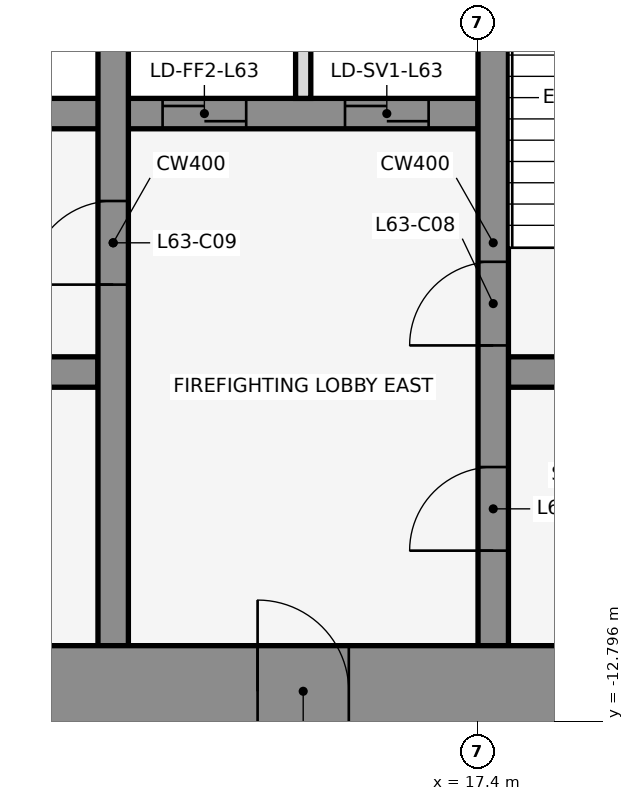
"""IFC4 building model, lengths in metres.
Left out: names, types, materials, properties, quantities, classifications, styles, units other than length and angle.
Written with IfcOpenShell. Run it as: python <this file> out.ifc"""

import sys

from ifc_helpers import new_model, si_unit, direction, frame, frame_2d, origin, place, context, subcontext, project, spatial, rectangle, extrude, element, fill, save


model = new_model("IFC4")
c1 = context("Model", 3, precision=1e-05, world=origin(), true_north=direction((0.0, 1.0)))
c2 = subcontext(c1, "Body", "Model", "MODEL_VIEW")
j1 = project(units=[si_unit("LENGTHUNIT", "METRE"), si_unit("PLANEANGLEUNIT", "RADIAN")], contexts=[c1])
p1 = place(None, origin())
s1 = spatial("IfcSite", under=j1, at=p1, CompositionType="ELEMENT")
p2 = place(p1, origin())
s2 = spatial("IfcBuilding", under=s1, at=p2, CompositionType="ELEMENT")
p3 = place(p2, frame((0.0, 0.0, 279.2)))
s3 = spatial("IfcBuildingStorey", under=s2, at=p3, CompositionType="ELEMENT", Elevation=279.2)
p4 = place(p3, frame((6.4, -8.2, 0.0), z_axis=(0.0, 0.0, 1.0), x_axis=(1.0, 0.0, 0.0)))
e1 = element("IfcWall", 1, at=p4, inside=s3, PredefinedType="SHEAR", context=c2, shape_type="SweptSolid", body=[
    extrude(rectangle(XDim=6.0, YDim=0.4, at=frame_2d((3.0, 0.0))), origin(), (0.0, 0.0, 1.0), 4.2),
])
p5 = place(p4, frame((2.65, 0.0, 0.0)))
e2 = element("IfcOpeningElement", 2, at=p5, cuts=e1, PredefinedType="OPENING", context=c2, shape_type="SweptSolid", body=[
    extrude(rectangle(XDim=0.9, YDim=2.1, at=frame_2d((0.45, 1.05))), frame((0.0, 0.212, 0.0), z_axis=(0.0, -1.0, 0.0), x_axis=(1.0, 0.0, 0.0)), (0.0, 0.0, 1.0), 0.424),
])
p6 = place(p3, frame((17.8, -8.2, 0.0), z_axis=(0.0, 0.0, 1.0), x_axis=(1.0, 0.0, 0.0)))
e3 = element("IfcWall", 3, at=p6, inside=s3, PredefinedType="SHEAR", context=c2, shape_type="SweptSolid", body=[
    extrude(rectangle(XDim=3.0, YDim=0.4, at=frame_2d((1.5, 0.0))), origin(), (0.0, 0.0, 1.0), 4.2),
])
p7 = place(p6, frame((0.85, 0.0, 0.0)))
e4 = element("IfcOpeningElement", 4, at=p7, cuts=e3, PredefinedType="OPENING", context=c2, shape_type="SweptSolid", body=[
    extrude(rectangle(XDim=1.2, YDim=2.1, at=frame_2d((0.6, 1.05))), frame((0.0, 0.212, 0.0), z_axis=(0.0, -1.0, 0.0), x_axis=(1.0, 0.0, 0.0)), (0.0, 0.0, 1.0), 0.424),
])
p8 = place(p3, frame((3.8, -4.8, 0.0), z_axis=(0.0, 0.0, 1.0), x_axis=(1.0, 0.0, 0.0)))
e5 = element("IfcWall", 5, at=p8, inside=s3, PredefinedType="SHEAR", context=c2, shape_type="SweptSolid", body=[
    extrude(rectangle(XDim=13.6, YDim=0.4, at=frame_2d((6.8, 0.0))), origin(), (0.0, 0.0, 1.0), 4.2),
])
p9 = place(p8, frame((0.75, 0.0, 0.0)))
e6 = element("IfcOpeningElement", 6, at=p9, cuts=e5, PredefinedType="OPENING", context=c2, shape_type="SweptSolid", body=[
    extrude(rectangle(XDim=1.2, YDim=2.1, at=frame_2d((0.6, 1.05))), frame((0.0, 0.212, 0.0), z_axis=(0.0, -1.0, 0.0), x_axis=(1.0, 0.0, 0.0)), (0.0, 0.0, 1.0), 0.424),
])
p10 = place(p8, frame((3.65, 0.0, 0.0)))
e7 = element("IfcOpeningElement", 7, at=p10, cuts=e5, PredefinedType="OPENING", context=c2, shape_type="SweptSolid", body=[
    extrude(rectangle(XDim=1.2, YDim=2.1, at=frame_2d((0.6, 1.05))), frame((0.0, 0.212, 0.0), z_axis=(0.0, -1.0, 0.0), x_axis=(1.0, 0.0, 0.0)), (0.0, 0.0, 1.0), 0.424),
])
p11 = place(p8, frame((6.65, 0.0, 0.0)))
e8 = element("IfcOpeningElement", 8, at=p11, cuts=e5, PredefinedType="OPENING", context=c2, shape_type="SweptSolid", body=[
    extrude(rectangle(XDim=1.2, YDim=2.1, at=frame_2d((0.6, 1.05))), frame((0.0, 0.212, 0.0), z_axis=(0.0, -1.0, 0.0), x_axis=(1.0, 0.0, 0.0)), (0.0, 0.0, 1.0), 0.424),
])
p12 = place(p8, frame((9.45, 0.0, 0.0)))
e9 = element("IfcOpeningElement", 9, at=p12, cuts=e5, PredefinedType="OPENING", context=c2, shape_type="SweptSolid", body=[
    extrude(rectangle(XDim=1.1, YDim=2.1, at=frame_2d((0.55, 1.05))), frame((0.0, 0.212, 0.0), z_axis=(0.0, -1.0, 0.0), x_axis=(1.0, 0.0, 0.0)), (0.0, 0.0, 1.0), 0.424),
])
p13 = place(p8, frame((11.85, 0.0, 0.0)))
e10 = element("IfcOpeningElement", 10, at=p13, cuts=e5, PredefinedType="OPENING", context=c2, shape_type="SweptSolid", body=[
    extrude(rectangle(XDim=1.1, YDim=2.1, at=frame_2d((0.55, 1.05))), frame((0.0, 0.212, 0.0), z_axis=(0.0, -1.0, 0.0), x_axis=(1.0, 0.0, 0.0)), (0.0, 0.0, 1.0), 0.424),
])
p14 = place(p3, frame((12.6, -11.8, 0.0), z_axis=(0.0, 0.0, 1.0), x_axis=(0.0, 1.0, 0.0)))
e11 = element("IfcWall", 11, at=p14, inside=s3, PredefinedType="SHEAR", context=c2, shape_type="SweptSolid", body=[
    extrude(rectangle(XDim=10.6, YDim=0.4, at=frame_2d((5.3, 0.0))), origin(), (0.0, 0.0, 1.0), 4.2),
])
p15 = place(p14, frame((4.75, 0.0, 0.0)))
e12 = element("IfcOpeningElement", 12, at=p15, cuts=e11, PredefinedType="OPENING", context=c2, shape_type="SweptSolid", body=[
    extrude(rectangle(XDim=1.1, YDim=2.1, at=frame_2d((0.55, 1.05))), frame((0.0, 0.212, 0.0), z_axis=(0.0, -1.0, 0.0), x_axis=(1.0, 0.0, 0.0)), (0.0, 0.0, 1.0), 0.424),
])
p16 = place(p3, frame((15.1, -4.6, 0.0), z_axis=(0.0, 0.0, 1.0), x_axis=(0.0, 1.0, 0.0)))
e13 = element("IfcWall", 13, at=p16, inside=s3, PredefinedType="PARTITIONING", context=c2, shape_type="SweptSolid", body=[
    extrude(rectangle(XDim=3.4, YDim=0.2, at=frame_2d((1.7, 0.0))), origin(), (0.0, 0.0, 1.0), 3.04),
])
p17 = place(p3, frame((17.6, -11.8, 0.0), z_axis=(0.0, 0.0, 1.0), x_axis=(0.0, 1.0, 0.0)))
e14 = element("IfcWall", 14, at=p17, inside=s3, PredefinedType="SHEAR", context=c2, shape_type="SweptSolid", body=[
    extrude(rectangle(XDim=10.6, YDim=0.4, at=frame_2d((5.3, 0.0))), origin(), (0.0, 0.0, 1.0), 4.2),
])
p18 = place(p17, frame((1.25, 0.0, 0.0)))
e15 = element("IfcOpeningElement", 15, at=p18, cuts=e14, PredefinedType="OPENING", context=c2, shape_type="SweptSolid", body=[
    extrude(rectangle(XDim=1.1, YDim=2.1, at=frame_2d((0.55, 1.05))), frame((0.0, 0.212, 0.0), z_axis=(0.0, -1.0, 0.0), x_axis=(1.0, 0.0, 0.0)), (0.0, 0.0, 1.0), 0.424),
])
p19 = place(p17, frame((3.95, 0.0, 0.0)))
e16 = element("IfcOpeningElement", 16, at=p19, cuts=e14, PredefinedType="OPENING", context=c2, shape_type="SweptSolid", body=[
    extrude(rectangle(XDim=1.1, YDim=2.1, at=frame_2d((0.55, 1.05))), frame((0.0, 0.212, 0.0), z_axis=(0.0, -1.0, 0.0), x_axis=(1.0, 0.0, 0.0)), (0.0, 0.0, 1.0), 0.424),
])
p20 = place(p3, frame((-22.0, -12.4, 0.0), z_axis=(0.0, 0.0, 1.0), x_axis=(1.0, 0.0, 0.0)))
e17 = element("IfcWall", 17, at=p20, inside=s3, PredefinedType="SHEAR", context=c2, shape_type="SweptSolid", body=[
    extrude(rectangle(XDim=44.0, YDim=1.2, at=frame_2d((22.0, 0.0))), origin(), (0.0, 0.0, 1.0), 4.2),
])
p21 = place(p20, frame((2.2, 0.0, 0.0)))
e18 = element("IfcOpeningElement", 18, at=p21, cuts=e17, PredefinedType="OPENING", context=c2, shape_type="SweptSolid", body=[
    extrude(rectangle(XDim=1.2, YDim=2.1, at=frame_2d((0.6, 1.05))), frame((0.0, 0.612, 0.0), z_axis=(0.0, -1.0, 0.0), x_axis=(1.0, 0.0, 0.0)), (0.0, 0.0, 1.0), 1.224),
])
p22 = place(p20, frame((21.4, 0.0, 0.0)))
e19 = element("IfcOpeningElement", 19, at=p22, cuts=e17, PredefinedType="OPENING", context=c2, shape_type="SweptSolid", body=[
    extrude(rectangle(XDim=1.2, YDim=2.1, at=frame_2d((0.6, 1.05))), frame((0.0, 0.612, 0.0), z_axis=(0.0, -1.0, 0.0), x_axis=(1.0, 0.0, 0.0)), (0.0, 0.0, 1.0), 1.224),
])
p23 = place(p20, frame((40.6, 0.0, 0.0)))
e20 = element("IfcOpeningElement", 20, at=p23, cuts=e17, PredefinedType="OPENING", context=c2, shape_type="SweptSolid", body=[
    extrude(rectangle(XDim=1.2, YDim=2.1, at=frame_2d((0.6, 1.05))), frame((0.0, 0.612, 0.0), z_axis=(0.0, -1.0, 0.0), x_axis=(1.0, 0.0, 0.0)), (0.0, 0.0, 1.0), 1.224),
])
p24 = place(p20, frame((16.0, 0.0, 0.0)))
e21 = element("IfcOpeningElement", 21, at=p24, cuts=e17, PredefinedType="OPENING", context=c2, shape_type="SweptSolid", body=[
    extrude(rectangle(XDim=1.8, YDim=2.1, at=frame_2d((0.9, 1.05))), frame((0.0, 0.612, 0.0), z_axis=(0.0, -1.0, 0.0), x_axis=(1.0, 0.0, 0.0)), (0.0, 0.0, 1.0), 1.224),
])
p25 = place(p20, frame((6.3, 0.0, 0.0)))
e22 = element("IfcOpeningElement", 22, at=p25, cuts=e17, PredefinedType="OPENING", context=c2, shape_type="SweptSolid", body=[
    extrude(rectangle(XDim=1.2, YDim=2.1, at=frame_2d((0.6, 1.05))), frame((0.0, 0.612, 0.0), z_axis=(0.0, -1.0, 0.0), x_axis=(1.0, 0.0, 0.0)), (0.0, 0.0, 1.0), 1.224),
])
p26 = place(p20, frame((26.2, 0.0, 0.0)))
e23 = element("IfcOpeningElement", 23, at=p26, cuts=e17, PredefinedType="OPENING", context=c2, shape_type="SweptSolid", body=[
    extrude(rectangle(XDim=1.8, YDim=2.1, at=frame_2d((0.9, 1.05))), frame((0.0, 0.612, 0.0), z_axis=(0.0, -1.0, 0.0), x_axis=(1.0, 0.0, 0.0)), (0.0, 0.0, 1.0), 1.224),
])
p27 = place(p20, frame((36.5, 0.0, 0.0)))
e24 = element("IfcOpeningElement", 24, at=p27, cuts=e17, PredefinedType="OPENING", context=c2, shape_type="SweptSolid", body=[
    extrude(rectangle(XDim=1.2, YDim=2.1, at=frame_2d((0.6, 1.05))), frame((0.0, 0.612, 0.0), z_axis=(0.0, -1.0, 0.0), x_axis=(1.0, 0.0, 0.0)), (0.0, 0.0, 1.0), 1.224),
])
p28 = place(p18, origin())
e25 = element("IfcDoor", 25, at=p28, inside=s3, OperationType="SINGLE_SWING_LEFT", PredefinedType="DOOR", context=c2, shape_type="SweptSolid", body=[
    extrude(rectangle(XDim=1.1, YDim=2.1, at=frame_2d((0.55, 1.05))), frame((0.0, 0.025, 0.0), z_axis=(0.0, -1.0, 0.0), x_axis=(1.0, 0.0, 0.0)), (0.0, 0.0, 1.0), 0.05),
])
fill(e15, e25)
p29 = place(p12, origin())
e26 = element("IfcDoor", 26, at=p29, inside=s3, OperationType="DOUBLE_DOOR_SLIDING", PredefinedType="DOOR", context=c2, shape_type="SweptSolid", body=[
    extrude(rectangle(XDim=1.1, YDim=2.1, at=frame_2d((0.55, 1.05))), frame((0.0, 0.025, 0.0), z_axis=(0.0, -1.0, 0.0), x_axis=(1.0, 0.0, 0.0)), (0.0, 0.0, 1.0), 0.05),
])
fill(e9, e26)
p30 = place(p13, origin())
e27 = element("IfcDoor", 27, at=p30, inside=s3, OperationType="DOUBLE_DOOR_SLIDING", PredefinedType="DOOR", context=c2, shape_type="SweptSolid", body=[
    extrude(rectangle(XDim=1.1, YDim=2.1, at=frame_2d((0.55, 1.05))), frame((0.0, 0.025, 0.0), z_axis=(0.0, -1.0, 0.0), x_axis=(1.0, 0.0, 0.0)), (0.0, 0.0, 1.0), 0.05),
])
fill(e10, e27)
p31 = place(p19, origin())
e28 = element("IfcDoor", 28, at=p31, inside=s3, OperationType="SINGLE_SWING_RIGHT", PredefinedType="DOOR", context=c2, shape_type="SweptSolid", body=[
    extrude(rectangle(XDim=1.1, YDim=2.1, at=frame_2d((0.55, 1.05))), frame((0.0, 0.025, 0.0), z_axis=(0.0, -1.0, 0.0), x_axis=(1.0, 0.0, 0.0)), (0.0, 0.0, 1.0), 0.05),
])
fill(e16, e28)
p32 = place(p15, frame((1.1, 0.0, 0.0), z_axis=(0.0, 0.0, 1.0), x_axis=(-1.0, 0.0, 0.0)))
e29 = element("IfcDoor", 29, at=p32, inside=s3, OperationType="SINGLE_SWING_RIGHT", PredefinedType="DOOR", context=c2, shape_type="SweptSolid", body=[
    extrude(rectangle(XDim=1.1, YDim=2.1, at=frame_2d((0.55, 1.05))), frame((0.0, 0.025, 0.0), z_axis=(0.0, -1.0, 0.0), x_axis=(1.0, 0.0, 0.0)), (0.0, 0.0, 1.0), 0.05),
])
fill(e12, e29)
p33 = place(p27, frame((1.2, 0.0, 0.0), z_axis=(0.0, 0.0, 1.0), x_axis=(-1.0, 0.0, 0.0)))
e30 = element("IfcDoor", 30, at=p33, inside=s3, OperationType="SINGLE_SWING_RIGHT", PredefinedType="DOOR", context=c2, shape_type="SweptSolid", body=[
    extrude(rectangle(XDim=1.2, YDim=2.1, at=frame_2d((0.6, 1.05))), frame((0.0, 0.025, 0.0), z_axis=(0.0, -1.0, 0.0), x_axis=(1.0, 0.0, 0.0)), (0.0, 0.0, 1.0), 0.05),
])
fill(e24, e30)
save(model, sys.argv[1])
